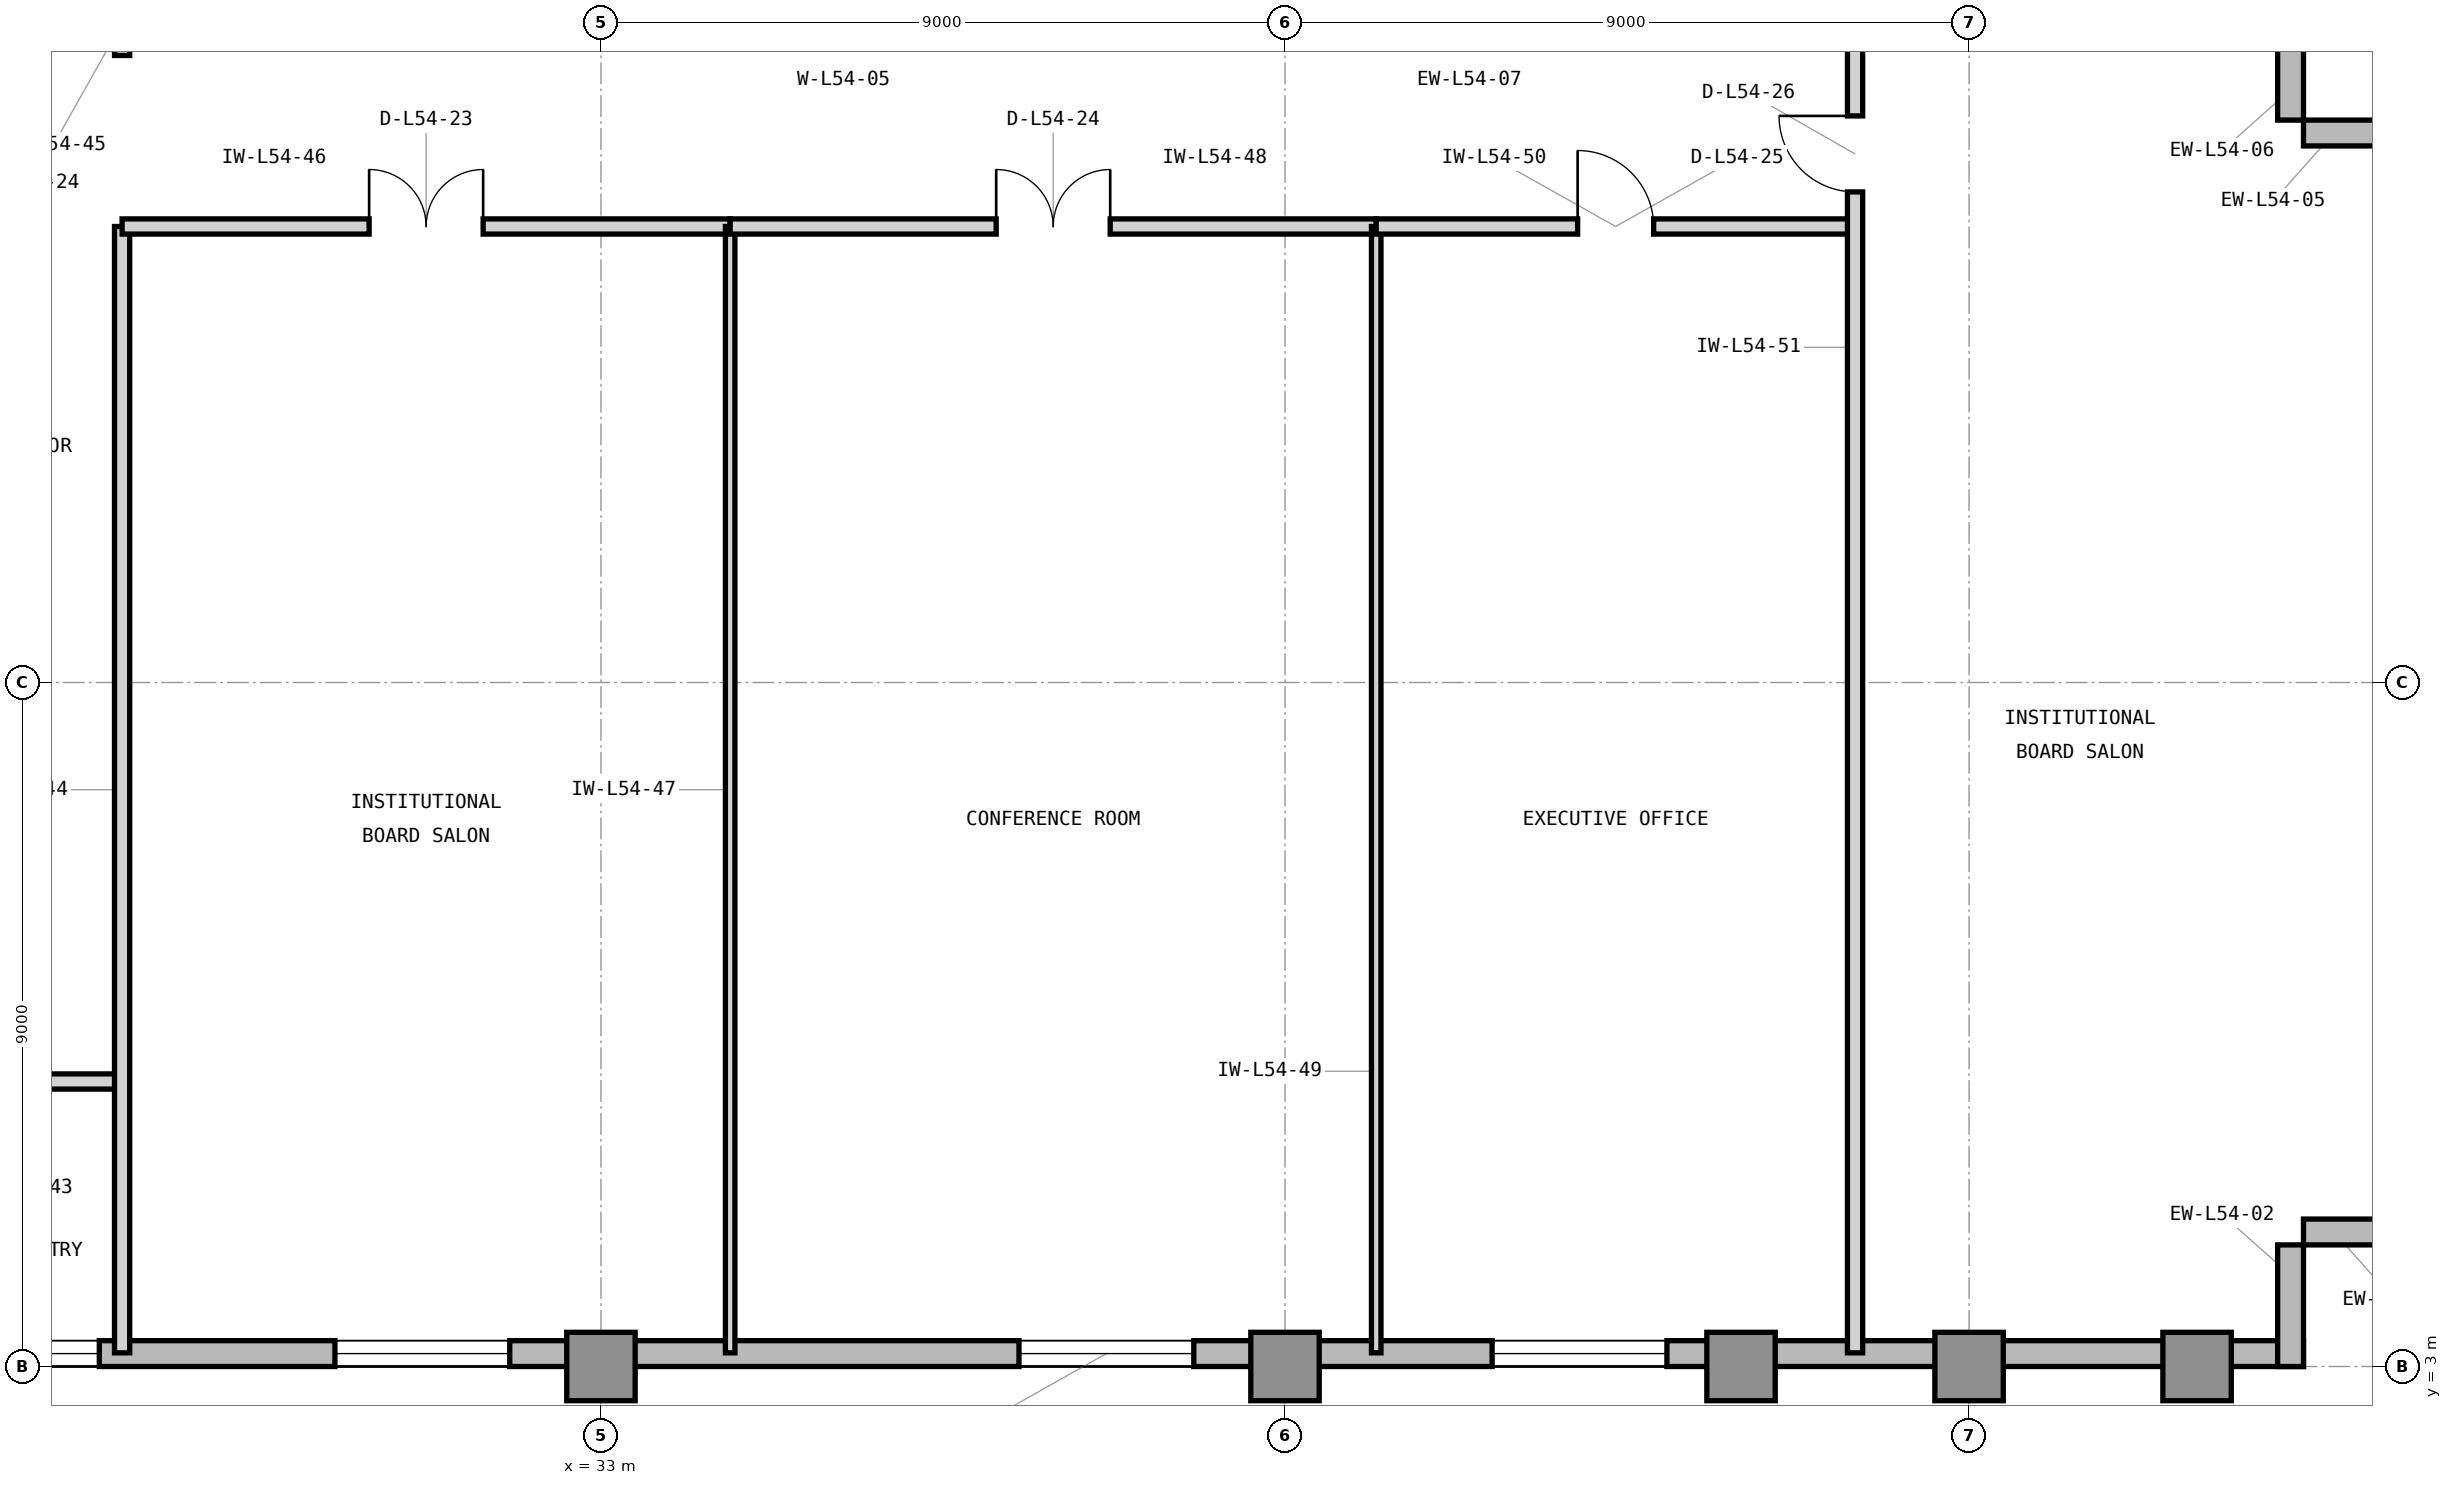
"""IFC4 building model, lengths in metres.
Left out: names, types, materials, properties, quantities, classifications, styles, units other than length and angle.
Written with IfcOpenShell. Run it as: python <this file> out.ifc"""

import sys

from ifc_helpers import new_model, si_unit, direction, frame, frame_2d, origin, origin_2d, place, context, subcontext, project, spatial, rectangle, extrude, element, fill, save


model = new_model("IFC4")
c1 = context("Model", 3, precision=1e-05, world=origin(), true_north=direction((0.0, 1.0)))
c2 = subcontext(c1, "Body", "Model", "MODEL_VIEW")
j1 = project(units=[si_unit("LENGTHUNIT", "METRE"), si_unit("PLANEANGLEUNIT", "RADIAN")], contexts=[c1])
p1 = place(None, origin())
s1 = spatial("IfcSite", under=j1, at=p1, CompositionType="ELEMENT")
p2 = place(p1, origin())
s2 = spatial("IfcBuilding", under=s1, at=p2, CompositionType="ELEMENT")
p3 = place(p2, frame((0.0, 0.0, 222.9)))
s3 = spatial("IfcBuildingStorey", under=s2, at=p3, CompositionType="ELEMENT", Elevation=222.9)
for number, where, z_axis, x_axis in (
    (1, (33.0, 3.0, 0.0), (0.0, 0.0, 1.0), (1.0, 0.0, 0.0)),
    (2, (42.0, 3.0, 0.0), (0.0, 0.0, 1.0), (1.0, 0.0, 0.0)),
    (3, (48.0, 3.0, 0.0), (0.0, 0.0, 1.0), (1.0, 0.0, 0.0)),
    (4, (51.0, 3.0, 0.0), (0.0, 0.0, 1.0), (1.0, 0.0, 0.0)),
    (5, (54.0, 3.0, 0.0), (0.0, 0.0, 1.0), (1.0, 0.0, 0.0)),
):
    element("IfcColumn", number, at=place(p3, frame(where, z_axis=z_axis, x_axis=x_axis)), inside=s3, PredefinedType="COLUMN", context=c2, shape_type="SweptSolid", body=[
        extrude(rectangle(XDim=0.9, YDim=0.9, at=origin_2d()), origin(), (0.0, 0.0, 1.0), 3.9),
    ])
p4 = place(p3, frame((23.9, 3.17, 0.0), z_axis=(0.0, 0.0, 1.0), x_axis=(1.0, 0.0, 0.0)))
e6 = element("IfcWall", 6, at=p4, inside=s3, PredefinedType="STANDARD", context=c2, shape_type="SweptSolid", body=[
    extrude(rectangle(XDim=31.5, YDim=0.34, at=frame_2d((15.75, 0.0))), origin(), (0.0, 0.0, 1.0), 3.62),
])
p5 = place(p4, frame((5.6, 0.0, 0.9)))
e7 = element("IfcOpeningElement", 7, at=p5, cuts=e6, PredefinedType="OPENING", context=c2, shape_type="SweptSolid", body=[
    extrude(rectangle(XDim=2.3, YDim=2.2, at=frame_2d((1.15, 1.1))), frame((0.0, 0.18, 0.0), z_axis=(0.0, -1.0, 0.0), x_axis=(1.0, 0.0, 0.0)), (0.0, 0.0, 1.0), 0.36),
])
p6 = place(p4, frame((14.6, 0.0, 0.9)))
e8 = element("IfcOpeningElement", 8, at=p6, cuts=e6, PredefinedType="OPENING", context=c2, shape_type="SweptSolid", body=[
    extrude(rectangle(XDim=2.3, YDim=2.2, at=frame_2d((1.15, 1.1))), frame((0.0, 0.18, 0.0), z_axis=(0.0, -1.0, 0.0), x_axis=(1.0, 0.0, 0.0)), (0.0, 0.0, 1.0), 0.36),
])
p7 = place(p4, frame((0.9, 0.0, 0.9)))
e9 = element("IfcOpeningElement", 9, at=p7, cuts=e6, PredefinedType="OPENING", context=c2, shape_type="SweptSolid", body=[
    extrude(rectangle(XDim=1.6, YDim=2.2, at=frame_2d((0.8, 1.1))), frame((0.0, 0.18, 0.0), z_axis=(0.0, -1.0, 0.0), x_axis=(1.0, 0.0, 0.0)), (0.0, 0.0, 1.0), 0.36),
])
p8 = place(p4, frame((20.825, 0.0, 0.9)))
e10 = element("IfcOpeningElement", 10, at=p8, cuts=e6, PredefinedType="OPENING", context=c2, shape_type="SweptSolid", body=[
    extrude(rectangle(XDim=2.3, YDim=2.2, at=frame_2d((1.15, 1.1))), frame((0.0, 0.18, 0.0), z_axis=(0.0, -1.0, 0.0), x_axis=(1.0, 0.0, 0.0)), (0.0, 0.0, 1.0), 0.36),
])
for number, where, z_axis, x_axis in (
    (11, (55.23, 3.0, 0.0), (0.0, 0.0, 1.0), (0.0, 1.0, 0.0)),
    (12, (55.4, 4.77, 0.0), (0.0, 0.0, 1.0), (1.0, 0.0, 0.0)),
    (13, (57.0, 19.23, 0.0), (0.0, 0.0, 1.0), (-1.0, 0.0, 0.0)),
    (14, (55.23, 19.4, 0.0), (0.0, 0.0, 1.0), (0.0, 1.0, 0.0)),
):
    element("IfcWall", number, at=place(p3, frame(where, z_axis=z_axis, x_axis=x_axis)), inside=s3, PredefinedType="STANDARD", context=c2, shape_type="SweptSolid", body=[
        extrude(rectangle(XDim=1.6, YDim=0.34, at=frame_2d((0.8, 0.0))), origin(), (0.0, 0.0, 1.0), 3.62),
    ])
p9 = place(p3, frame((23.85, 6.75, 0.0), z_axis=(0.0, 0.0, 1.0), x_axis=(1.0, 0.0, 0.0)))
e15 = element("IfcWall", 15, at=p9, inside=s3, PredefinedType="PARTITIONING", context=c2, shape_type="SweptSolid", body=[
    extrude(rectangle(XDim=2.85, YDim=0.2, at=frame_2d((1.425, 0.0))), origin(), (0.0, 0.0, 1.0), 3.61),
])
p10 = place(p9, frame((0.7, 0.0, 0.0)))
e16 = element("IfcOpeningElement", 16, at=p10, cuts=e15, PredefinedType="OPENING", context=c2, shape_type="SweptSolid", body=[
    extrude(rectangle(XDim=1.0, YDim=2.15, at=frame_2d((0.5, 1.075))), frame((0.0, 0.11, 0.0), z_axis=(0.0, -1.0, 0.0), x_axis=(1.0, 0.0, 0.0)), (0.0, 0.0, 1.0), 0.22),
])
p11 = place(p3, frame((26.7, 3.18, 0.0), z_axis=(0.0, 0.0, 1.0), x_axis=(0.0, 1.0, 0.0)))
e17 = element("IfcWall", 17, at=p11, inside=s3, PredefinedType="PARTITIONING", context=c2, shape_type="SweptSolid", body=[
    extrude(rectangle(XDim=14.82, YDim=0.2, at=frame_2d((7.41, 0.0))), origin(), (0.0, 0.0, 1.0), 3.61),
])
p12 = place(p3, frame((26.7, 20.25, 0.0), z_axis=(0.0, 0.0, 1.0), x_axis=(0.0, 1.0, 0.0)))
e18 = element("IfcWall", 18, at=p12, inside=s3, PredefinedType="PARTITIONING", context=c2, shape_type="SweptSolid", body=[
    extrude(rectangle(XDim=0.57, YDim=0.2, at=frame_2d((0.285, 0.0))), origin(), (0.0, 0.0, 1.0), 3.61),
])
p13 = place(p3, frame((26.7, 18.0, 0.0), z_axis=(0.0, 0.0, 1.0), x_axis=(1.0, 0.0, 0.0)))
e19 = element("IfcWall", 19, at=p13, inside=s3, PredefinedType="PARTITIONING", context=c2, shape_type="SweptSolid", body=[
    extrude(rectangle(XDim=8.0, YDim=0.2, at=frame_2d((4.0, 0.0))), origin(), (0.0, 0.0, 1.0), 3.073),
])
p14 = place(p13, frame((3.25, 0.0, 0.0)))
e20 = element("IfcOpeningElement", 20, at=p14, cuts=e19, PredefinedType="OPENING", context=c2, shape_type="SweptSolid", body=[
    extrude(rectangle(XDim=1.5, YDim=2.3, at=frame_2d((0.75, 1.15))), frame((0.0, 0.11, 0.0), z_axis=(0.0, -1.0, 0.0), x_axis=(1.0, 0.0, 0.0)), (0.0, 0.0, 1.0), 0.22),
])
p15 = place(p3, frame((34.7, 3.18, 0.0), z_axis=(0.0, 0.0, 1.0), x_axis=(0.0, 1.0, 0.0)))
e21 = element("IfcWall", 21, at=p15, inside=s3, PredefinedType="PARTITIONING", context=c2, shape_type="SweptSolid", body=[
    extrude(rectangle(XDim=14.82, YDim=0.125, at=frame_2d((7.41, 0.0))), origin(), (0.0, 0.0, 1.0), 3.61),
])
p16 = place(p3, frame((34.7, 18.0, 0.0), z_axis=(0.0, 0.0, 1.0), x_axis=(1.0, 0.0, 0.0)))
e22 = element("IfcWall", 22, at=p16, inside=s3, PredefinedType="PARTITIONING", context=c2, shape_type="SweptSolid", body=[
    extrude(rectangle(XDim=8.5, YDim=0.2, at=frame_2d((4.25, 0.0))), origin(), (0.0, 0.0, 1.0), 3.073),
])
p17 = place(p16, frame((3.5, 0.0, 0.0)))
e23 = element("IfcOpeningElement", 23, at=p17, cuts=e22, PredefinedType="OPENING", context=c2, shape_type="SweptSolid", body=[
    extrude(rectangle(XDim=1.5, YDim=2.3, at=frame_2d((0.75, 1.15))), frame((0.0, 0.11, 0.0), z_axis=(0.0, -1.0, 0.0), x_axis=(1.0, 0.0, 0.0)), (0.0, 0.0, 1.0), 0.22),
])
p18 = place(p3, frame((43.2, 3.18, 0.0), z_axis=(0.0, 0.0, 1.0), x_axis=(0.0, 1.0, 0.0)))
e24 = element("IfcWall", 24, at=p18, inside=s3, PredefinedType="PARTITIONING", context=c2, shape_type="SweptSolid", body=[
    extrude(rectangle(XDim=14.82, YDim=0.125, at=frame_2d((7.41, 0.0))), origin(), (0.0, 0.0, 1.0), 3.61),
])
p19 = place(p3, frame((43.2, 18.0, 0.0), z_axis=(0.0, 0.0, 1.0), x_axis=(1.0, 0.0, 0.0)))
e25 = element("IfcWall", 25, at=p19, inside=s3, PredefinedType="PARTITIONING", context=c2, shape_type="SweptSolid", body=[
    extrude(rectangle(XDim=6.3, YDim=0.2, at=frame_2d((3.15, 0.0))), origin(), (0.0, 0.0, 1.0), 3.073),
])
p20 = place(p19, frame((2.65, 0.0, 0.0)))
e26 = element("IfcOpeningElement", 26, at=p20, cuts=e25, PredefinedType="OPENING", context=c2, shape_type="SweptSolid", body=[
    extrude(rectangle(XDim=1.0, YDim=2.15, at=frame_2d((0.5, 1.075))), frame((0.0, 0.11, 0.0), z_axis=(0.0, -1.0, 0.0), x_axis=(1.0, 0.0, 0.0)), (0.0, 0.0, 1.0), 0.22),
])
p21 = place(p3, frame((49.5, 3.18, 0.0), z_axis=(0.0, 0.0, 1.0), x_axis=(0.0, 1.0, 0.0)))
e27 = element("IfcWall", 27, at=p21, inside=s3, PredefinedType="PARTITIONING", context=c2, shape_type="SweptSolid", body=[
    extrude(rectangle(XDim=17.64, YDim=0.2, at=frame_2d((8.82, 0.0))), origin(), (0.0, 0.0, 1.0), 3.61),
])
p22 = place(p21, frame((15.275, 0.0, 0.0)))
e28 = element("IfcOpeningElement", 28, at=p22, cuts=e27, PredefinedType="OPENING", context=c2, shape_type="SweptSolid", body=[
    extrude(rectangle(XDim=1.0, YDim=2.15, at=frame_2d((0.5, 1.075))), frame((0.0, 0.11, 0.0), z_axis=(0.0, -1.0, 0.0), x_axis=(1.0, 0.0, 0.0)), (0.0, 0.0, 1.0), 0.22),
])
p23 = place(p5, origin())
e29 = element("IfcWindow", 29, at=p23, inside=s3, PartitioningType="SINGLE_PANEL", PredefinedType="WINDOW", context=c2, shape_type="SweptSolid", body=[
    extrude(rectangle(XDim=2.3, YDim=2.2, at=frame_2d((1.15, 1.1))), frame((0.0, 0.11, 0.0), z_axis=(0.0, -1.0, 0.0), x_axis=(1.0, 0.0, 0.0)), (0.0, 0.0, 1.0), 0.06),
])
fill(e7, e29)
p24 = place(p6, origin())
e30 = element("IfcWindow", 30, at=p24, inside=s3, PartitioningType="SINGLE_PANEL", PredefinedType="WINDOW", context=c2, shape_type="SweptSolid", body=[
    extrude(rectangle(XDim=2.3, YDim=2.2, at=frame_2d((1.15, 1.1))), frame((0.0, 0.11, 0.0), z_axis=(0.0, -1.0, 0.0), x_axis=(1.0, 0.0, 0.0)), (0.0, 0.0, 1.0), 0.06),
])
fill(e8, e30)
p25 = place(p14, origin())
e31 = element("IfcDoor", 31, at=p25, inside=s3, OperationType="DOUBLE_DOOR_SINGLE_SWING", PredefinedType="DOOR", context=c2, shape_type="SweptSolid", body=[
    extrude(rectangle(XDim=1.5, YDim=2.3, at=frame_2d((0.75, 1.15))), frame((0.0, 0.025, 0.0), z_axis=(0.0, -1.0, 0.0), x_axis=(1.0, 0.0, 0.0)), (0.0, 0.0, 1.0), 0.05),
])
fill(e20, e31)
p26 = place(p17, origin())
e32 = element("IfcDoor", 32, at=p26, inside=s3, OperationType="DOUBLE_DOOR_SINGLE_SWING", PredefinedType="DOOR", context=c2, shape_type="SweptSolid", body=[
    extrude(rectangle(XDim=1.5, YDim=2.3, at=frame_2d((0.75, 1.15))), frame((0.0, 0.025, 0.0), z_axis=(0.0, -1.0, 0.0), x_axis=(1.0, 0.0, 0.0)), (0.0, 0.0, 1.0), 0.05),
])
fill(e23, e32)
p27 = place(p20, origin())
e33 = element("IfcDoor", 33, at=p27, inside=s3, OperationType="SINGLE_SWING_LEFT", PredefinedType="DOOR", context=c2, shape_type="SweptSolid", body=[
    extrude(rectangle(XDim=1.0, YDim=2.15, at=frame_2d((0.5, 1.075))), frame((0.0, 0.025, 0.0), z_axis=(0.0, -1.0, 0.0), x_axis=(1.0, 0.0, 0.0)), (0.0, 0.0, 1.0), 0.05),
])
fill(e26, e33)
p28 = place(p22, origin())
e34 = element("IfcDoor", 34, at=p28, inside=s3, OperationType="SINGLE_SWING_RIGHT", PredefinedType="DOOR", context=c2, shape_type="SweptSolid", body=[
    extrude(rectangle(XDim=1.0, YDim=2.15, at=frame_2d((0.5, 1.075))), frame((0.0, 0.025, 0.0), z_axis=(0.0, -1.0, 0.0), x_axis=(1.0, 0.0, 0.0)), (0.0, 0.0, 1.0), 0.05),
])
fill(e28, e34)
p29 = place(p7, origin())
e35 = element("IfcWindow", 35, at=p29, inside=s3, PartitioningType="SINGLE_PANEL", PredefinedType="WINDOW", context=c2, shape_type="SweptSolid", body=[
    extrude(rectangle(XDim=1.6, YDim=2.2, at=frame_2d((0.8, 1.1))), frame((0.0, 0.11, 0.0), z_axis=(0.0, -1.0, 0.0), x_axis=(1.0, 0.0, 0.0)), (0.0, 0.0, 1.0), 0.06),
])
fill(e9, e35)
p30 = place(p8, origin())
e36 = element("IfcWindow", 36, at=p30, inside=s3, PartitioningType="SINGLE_PANEL", PredefinedType="WINDOW", context=c2, shape_type="SweptSolid", body=[
    extrude(rectangle(XDim=2.3, YDim=2.2, at=frame_2d((1.15, 1.1))), frame((0.0, 0.11, 0.0), z_axis=(0.0, -1.0, 0.0), x_axis=(1.0, 0.0, 0.0)), (0.0, 0.0, 1.0), 0.06),
])
fill(e10, e36)
save(model, sys.argv[1])
